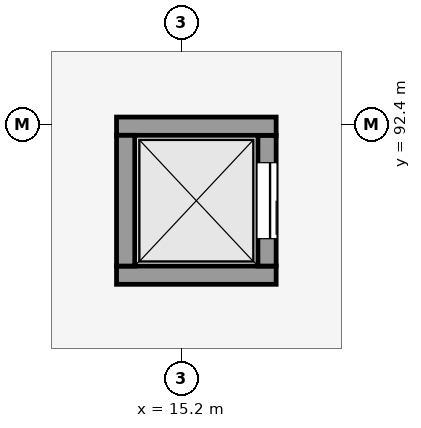
"""IFC4 building model, lengths in metres.
Left out: names, types, materials, properties, quantities, classifications, styles, units other than length and angle.
Written with IfcOpenShell. Run it as: python <this file> out.ifc"""

import sys

from ifc_helpers import new_model, si_unit, direction, frame, frame_2d, origin, place, context, subcontext, project, spatial, rectangle, extrude, element, fill, save


model = new_model("IFC4")
c1 = context("Model", 3, precision=1e-05, world=origin(), true_north=direction((0.0, 1.0)))
c2 = subcontext(c1, "Body", "Model", "MODEL_VIEW")
j1 = project(units=[si_unit("LENGTHUNIT", "METRE"), si_unit("PLANEANGLEUNIT", "RADIAN")], contexts=[c1])
p1 = place(None, origin())
s1 = spatial("IfcSite", under=j1, at=p1, CompositionType="ELEMENT")
p2 = place(p1, origin())
s2 = spatial("IfcBuilding", under=s1, at=p2, CompositionType="ELEMENT")
p3 = place(p2, frame((0.0, 0.0, 13.2)))
s3 = spatial("IfcBuildingStorey", under=s2, at=p3, CompositionType="ELEMENT", Elevation=13.2)
p4 = place(p3, frame((9.91, 96.222, 0.0), z_axis=(0.0, 0.0, 1.0), x_axis=(0.96792914822, -0.251223334956, 0.0)))
e1 = element("IfcWall", 1, at=p4, inside=s3, PredefinedType="SHEAR", context=c2, shape_type="SweptSolid", body=[
    extrude(rectangle(XDim=12.1, YDim=0.38, at=frame_2d((6.05, 0.0))), origin(), (0.0, 0.0, 1.0), 3.75),
])
p5 = place(p3, frame((16.45, 90.42, 0.0), z_axis=(0.0, 0.0, 1.0), x_axis=(-1.0, 0.0, 0.0)))
e2 = element("IfcWall", 2, at=p5, inside=s3, PredefinedType="SHEAR", context=c2, shape_type="SweptSolid", body=[
    extrude(rectangle(XDim=2.1, YDim=0.24, at=frame_2d((1.05, 0.0))), origin(), (0.0, 0.0, 1.0), 4.05),
])
p6 = place(p3, frame((16.33, 92.26, 0.0), z_axis=(0.0, 0.0, 1.0), x_axis=(0.0, -1.0, 0.0)))
e3 = element("IfcWall", 3, at=p6, inside=s3, PredefinedType="SHEAR", context=c2, shape_type="SweptSolid", body=[
    extrude(rectangle(XDim=1.72, YDim=0.24, at=frame_2d((0.86, 0.0))), origin(), (0.0, 0.0, 1.0), 4.05),
])
p7 = place(p6, frame((0.36, 0.0, 0.0)))
e4 = element("IfcOpeningElement", 4, at=p7, cuts=e3, PredefinedType="OPENING", context=c2, shape_type="SweptSolid", body=[
    extrude(rectangle(XDim=1.0, YDim=2.15, at=frame_2d((0.5, 1.075))), frame((0.0, 0.13, 0.0), z_axis=(0.0, -1.0, 0.0), x_axis=(1.0, 0.0, 0.0)), (0.0, 0.0, 1.0), 0.26),
])
p8 = place(p3, frame((14.35, 92.38, 0.0), z_axis=(0.0, 0.0, 1.0), x_axis=(1.0, 0.0, 0.0)))
e5 = element("IfcWall", 5, at=p8, inside=s3, PredefinedType="SHEAR", context=c2, shape_type="SweptSolid", body=[
    extrude(rectangle(XDim=2.1, YDim=0.24, at=frame_2d((1.05, 0.0))), origin(), (0.0, 0.0, 1.0), 4.05),
])
p9 = place(p3, frame((14.47, 90.54, 0.0), z_axis=(0.0, 0.0, 1.0), x_axis=(0.0, 1.0, 0.0)))
e6 = element("IfcWall", 6, at=p9, inside=s3, PredefinedType="SHEAR", context=c2, shape_type="SweptSolid", body=[
    extrude(rectangle(XDim=1.72, YDim=0.24, at=frame_2d((0.86, 0.0))), origin(), (0.0, 0.0, 1.0), 4.05),
])
p10 = place(p7, origin())
e7 = element("IfcDoor", 7, at=p10, inside=s3, OperationType="SLIDING_TO_RIGHT", PredefinedType="DOOR", context=c2, shape_type="SweptSolid", body=[
    extrude(rectangle(XDim=1.0, YDim=2.15, at=frame_2d((0.5, 1.075))), frame((0.0, 0.025, 0.0), z_axis=(0.0, -1.0, 0.0), x_axis=(1.0, 0.0, 0.0)), (0.0, 0.0, 1.0), 0.05),
])
fill(e4, e7)
save(model, sys.argv[1])
